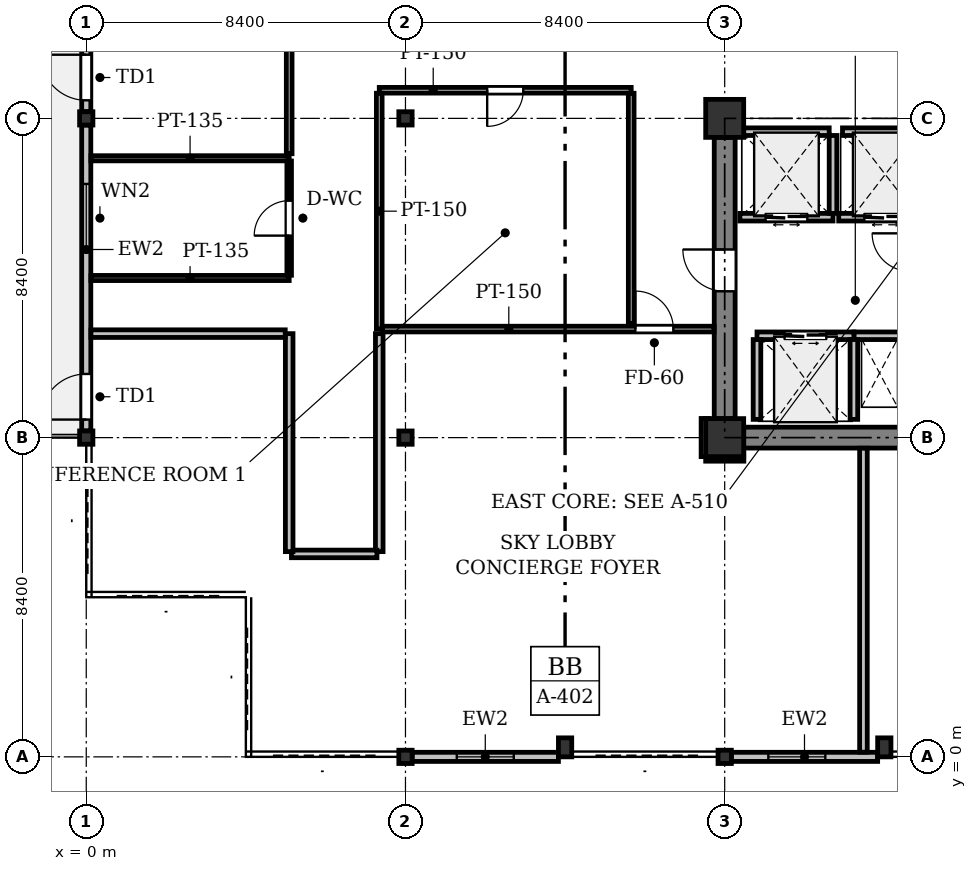
"""IFC4 building model, lengths in metres.
Left out: names, types, materials, properties, quantities, classifications, styles, units other than length and angle.
Written with IfcOpenShell. Run it as: python <this file> out.ifc"""

import sys

from ifc_helpers import new_model, si_unit, direction, frame, frame_2d, origin, origin_2d, place, context, subcontext, project, spatial, rectangle, i_section, extrude, element, fill, save


model = new_model("IFC4")
c1 = context("Model", 3, precision=1e-05, world=origin(), true_north=direction((0.0, 1.0)))
c2 = subcontext(c1, "Body", "Model", "MODEL_VIEW")
j1 = project(units=[si_unit("LENGTHUNIT", "METRE"), si_unit("PLANEANGLEUNIT", "RADIAN")], contexts=[c1])
p1 = place(None, origin())
s1 = spatial("IfcSite", under=j1, at=p1, CompositionType="ELEMENT")
p2 = place(p1, origin())
s2 = spatial("IfcBuilding", under=s1, at=p2, CompositionType="ELEMENT")
p3 = place(p2, frame((0.0, 0.0, 220.6)))
s3 = spatial("IfcBuildingStorey", under=s2, at=p3, CompositionType="ELEMENT", Elevation=220.6)
for number, where, z_axis, x_axis in (
    (1, (0.0, 8.4, 0.0), (0.0, 0.0, 1.0), (1.0, 0.0, 0.0)),
    (2, (0.0, 16.8, 0.0), (0.0, 0.0, 1.0), (1.0, 0.0, 0.0)),
    (3, (8.4, 0.0, 0.0), (0.0, 0.0, 1.0), (1.0, 0.0, 0.0)),
    (4, (8.4, 8.4, 0.0), (0.0, 0.0, 1.0), (1.0, 0.0, 0.0)),
    (5, (8.4, 16.8, 0.0), (0.0, 0.0, 1.0), (1.0, 0.0, 0.0)),
    (6, (16.8, 0.0, 0.0), (0.0, 0.0, 1.0), (1.0, 0.0, 0.0)),
):
    element("IfcColumn", number, at=place(p3, frame(where, z_axis=z_axis, x_axis=x_axis)), inside=s3, PredefinedType="COLUMN", context=c2, shape_type="SweptSolid", body=[
        extrude(i_section(OverallWidth=0.35, OverallDepth=0.35, WebThickness=0.02, FlangeThickness=0.032, at=origin_2d()), origin(), (0.0, 0.0, 1.0), 4.1),
    ])
for number, where, z_axis, x_axis in (
    (7, (16.8, 8.4, 0.0), (0.0, 0.0, 1.0), (1.0, 0.0, 0.0)),
    (8, (16.8, 16.8, 0.0), (0.0, 0.0, 1.0), (1.0, 0.0, 0.0)),
):
    element("IfcColumn", number, at=place(p3, frame(where, z_axis=z_axis, x_axis=x_axis)), inside=s3, PredefinedType="COLUMN", context=c2, shape_type="SweptSolid", body=[
        extrude(rectangle(XDim=1.0, YDim=1.0, at=origin_2d()), origin(), (0.0, 0.0, 1.0), 4.1),
    ])
for number, where, z_axis, x_axis in (
    (9, (12.6, 0.25, 0.0), (0.0, 0.0, 1.0), (1.0, 0.0, 0.0)),
    (10, (21.0, 0.25, 0.0), (0.0, 0.0, 1.0), (1.0, 0.0, 0.0)),
):
    element("IfcColumn", number, at=place(p3, frame(where, z_axis=z_axis, x_axis=x_axis)), inside=s3, PredefinedType="PILASTER", context=c2, shape_type="SweptSolid", body=[
        extrude(rectangle(XDim=0.35, YDim=0.5, at=origin_2d()), origin(), (0.0, 0.0, 1.0), 4.1),
    ])
p4 = place(p3, frame((20.825, 0.0, 0.0), z_axis=(0.0, 0.0, 1.0), x_axis=(-1.0, 0.0, 0.0)))
e11 = element("IfcWall", 11, at=p4, inside=s3, PredefinedType="STANDARD", context=c2, shape_type="SweptSolid", body=[
    extrude(rectangle(XDim=3.85, YDim=0.24, at=frame_2d((1.925, 0.0))), origin(), (0.0, 0.0, 1.0), 3.525),
])
p5 = place(p4, frame((1.377, 0.0, 0.9)))
e12 = element("IfcOpeningElement", 12, at=p5, cuts=e11, PredefinedType="OPENING", context=c2, shape_type="SweptSolid", body=[
    extrude(rectangle(XDim=1.5, YDim=1.6, at=frame_2d((0.75, 0.8))), frame((0.0, 0.13, 0.0), z_axis=(0.0, -1.0, 0.0), x_axis=(1.0, 0.0, 0.0)), (0.0, 0.0, 1.0), 0.26),
])
p6 = place(p3, frame((12.425, 0.0, 0.0), z_axis=(0.0, 0.0, 1.0), x_axis=(-1.0, 0.0, 0.0)))
e13 = element("IfcWall", 13, at=p6, inside=s3, PredefinedType="STANDARD", context=c2, shape_type="SweptSolid", body=[
    extrude(rectangle(XDim=3.85, YDim=0.24, at=frame_2d((1.925, 0.0))), origin(), (0.0, 0.0, 1.0), 3.525),
])
p7 = place(p6, frame((1.175, 0.0, 0.9)))
e14 = element("IfcOpeningElement", 14, at=p7, cuts=e13, PredefinedType="OPENING", context=c2, shape_type="SweptSolid", body=[
    extrude(rectangle(XDim=1.5, YDim=1.6, at=frame_2d((0.75, 0.8))), frame((0.0, 0.13, 0.0), z_axis=(0.0, -1.0, 0.0), x_axis=(1.0, 0.0, 0.0)), (0.0, 0.0, 1.0), 0.26),
])
p8 = place(p3, frame((0.0, 8.575, 0.0), z_axis=(0.0, 0.0, 1.0), x_axis=(0.0, 1.0, 0.0)))
e15 = element("IfcWall", 15, at=p8, inside=s3, PredefinedType="STANDARD", context=c2, shape_type="SweptSolid", body=[
    extrude(rectangle(XDim=8.05, YDim=0.24, at=frame_2d((4.025, 0.0))), origin(), (0.0, 0.0, 1.0), 3.525),
])
p9 = place(p8, frame((0.3, 0.0, 0.0)))
e16 = element("IfcOpeningElement", 16, at=p9, cuts=e15, PredefinedType="OPENING", context=c2, shape_type="SweptSolid", body=[
    extrude(rectangle(XDim=1.2, YDim=2.2, at=frame_2d((0.6, 1.1))), frame((0.0, 0.13, 0.0), z_axis=(0.0, -1.0, 0.0), x_axis=(1.0, 0.0, 0.0)), (0.0, 0.0, 1.0), 0.26),
])
p10 = place(p8, frame((4.7, 0.0, 0.9)))
e17 = element("IfcOpeningElement", 17, at=p10, cuts=e15, PredefinedType="OPENING", context=c2, shape_type="SweptSolid", body=[
    extrude(rectangle(XDim=1.8, YDim=1.6, at=frame_2d((0.9, 0.8))), frame((0.0, 0.13, 0.0), z_axis=(0.0, -1.0, 0.0), x_axis=(1.0, 0.0, 0.0)), (0.0, 0.0, 1.0), 0.26),
])
p11 = place(p3, frame((0.0, 16.975, 0.0), z_axis=(0.0, 0.0, 1.0), x_axis=(0.0, 1.0, 0.0)))
e18 = element("IfcWall", 18, at=p11, inside=s3, PredefinedType="STANDARD", context=c2, shape_type="SweptSolid", body=[
    extrude(rectangle(XDim=8.05, YDim=0.24, at=frame_2d((4.025, 0.0))), origin(), (0.0, 0.0, 1.0), 3.525),
])
p12 = place(p11, frame((0.3, 0.0, 0.0)))
e19 = element("IfcOpeningElement", 19, at=p12, cuts=e18, PredefinedType="OPENING", context=c2, shape_type="SweptSolid", body=[
    extrude(rectangle(XDim=1.2, YDim=2.2, at=frame_2d((0.6, 1.1))), frame((0.0, 0.13, 0.0), z_axis=(0.0, -1.0, 0.0), x_axis=(1.0, 0.0, 0.0)), (0.0, 0.0, 1.0), 0.26),
])
p13 = place(p11, frame((3.275, 0.0, 0.9)))
e20 = element("IfcOpeningElement", 20, at=p13, cuts=e18, PredefinedType="OPENING", context=c2, shape_type="SweptSolid", body=[
    extrude(rectangle(XDim=1.5, YDim=1.6, at=frame_2d((0.75, 0.8))), frame((0.0, 0.13, 0.0), z_axis=(0.0, -1.0, 0.0), x_axis=(1.0, 0.0, 0.0)), (0.0, 0.0, 1.0), 0.26),
])
p14 = place(p3, frame((17.3, 8.4, 0.0), z_axis=(0.0, 0.0, 1.0), x_axis=(1.0, 0.0, 0.0)))
e21 = element("IfcWall", 21, at=p14, inside=s3, PredefinedType="SHEAR", context=c2, shape_type="SweptSolid", body=[
    extrude(rectangle(XDim=7.4, YDim=0.55, at=frame_2d((3.7, 0.0))), origin(), (0.0, 0.0, 1.0), 3.825),
])
p15 = place(p3, frame((16.8, 8.9, 0.0), z_axis=(0.0, 0.0, 1.0), x_axis=(0.0, 1.0, 0.0)))
e22 = element("IfcWall", 22, at=p15, inside=s3, PredefinedType="SHEAR", context=c2, shape_type="SweptSolid", body=[
    extrude(rectangle(XDim=7.4, YDim=0.55, at=frame_2d((3.7, 0.0))), origin(), (0.0, 0.0, 1.0), 3.825),
])
p16 = place(p15, frame((3.35, 0.0, 0.0)))
e23 = element("IfcOpeningElement", 23, at=p16, cuts=e22, PredefinedType="OPENING", context=c2, shape_type="SweptSolid", body=[
    extrude(rectangle(XDim=1.1, YDim=2.15, at=frame_2d((0.55, 1.075))), frame((0.0, 0.285, 0.0), z_axis=(0.0, -1.0, 0.0), x_axis=(1.0, 0.0, 0.0)), (0.0, 0.0, 1.0), 0.57),
])
p17 = place(p3, frame((20.2, 11.08, 0.0), z_axis=(0.0, 0.0, 1.0), x_axis=(1.0, 0.0, 0.0)))
e24 = element("IfcWall", 24, at=p17, inside=s3, PredefinedType="PARTITIONING", context=c2, shape_type="SweptSolid", body=[
    extrude(rectangle(XDim=1.35, YDim=0.2, at=frame_2d((0.675, 0.0))), origin(), (0.0, 0.0, 1.0), 3.825),
])
p18 = place(p3, frame((17.65, 11.08, 0.0), z_axis=(0.0, 0.0, 1.0), x_axis=(1.0, 0.0, 0.0)))
e25 = element("IfcWall", 25, at=p18, inside=s3, PredefinedType="PARTITIONING", context=c2, shape_type="SweptSolid", body=[
    extrude(rectangle(XDim=2.55, YDim=0.2, at=frame_2d((1.275, 0.0))), origin(), (0.0, 0.0, 1.0), 3.825),
])
p19 = place(p18, frame((0.725, 0.0, 0.0)))
e26 = element("IfcOpeningElement", 26, at=p19, cuts=e25, PredefinedType="OPENING", context=c2, shape_type="SweptSolid", body=[
    extrude(rectangle(XDim=1.1, YDim=2.2, at=frame_2d((0.55, 1.1))), frame((0.0, 0.11, 0.0), z_axis=(0.0, -1.0, 0.0), x_axis=(1.0, 0.0, 0.0)), (0.0, 0.0, 1.0), 0.22),
])
for number, where, z_axis, x_axis in (
    (27, (20.2, 8.88, 0.0), (0.0, 0.0, 1.0), (0.0, 1.0, 0.0)),
    (28, (17.65, 8.88, 0.0), (0.0, 0.0, 1.0), (0.0, 1.0, 0.0)),
):
    element("IfcWall", number, at=place(p3, frame(where, z_axis=z_axis, x_axis=x_axis)), inside=s3, PredefinedType="PARTITIONING", context=c2, shape_type="SweptSolid", body=[
        extrude(rectangle(XDim=2.1, YDim=0.2, at=frame_2d((1.05, 0.0))), origin(), (0.0, 0.0, 1.0), 3.825),
    ])
p20 = place(p3, frame((17.2, 14.2, 0.0), z_axis=(0.0, 0.0, 1.0), x_axis=(1.0, 0.0, 0.0)))
e29 = element("IfcWall", 29, at=p20, inside=s3, PredefinedType="PARTITIONING", context=c2, shape_type="SweptSolid", body=[
    extrude(rectangle(XDim=2.45, YDim=0.2, at=frame_2d((1.225, 0.0))), origin(), (0.0, 0.0, 1.0), 3.825),
])
p21 = place(p20, frame((0.675, 0.0, 0.0)))
e30 = element("IfcOpeningElement", 30, at=p21, cuts=e29, PredefinedType="OPENING", context=c2, shape_type="SweptSolid", body=[
    extrude(rectangle(XDim=1.1, YDim=2.2, at=frame_2d((0.55, 1.1))), frame((0.0, 0.11, 0.0), z_axis=(0.0, -1.0, 0.0), x_axis=(1.0, 0.0, 0.0)), (0.0, 0.0, 1.0), 0.22),
])
p22 = place(p3, frame((19.65, 14.3, 0.0), z_axis=(0.0, 0.0, 1.0), x_axis=(0.0, 1.0, 0.0)))
e31 = element("IfcWall", 31, at=p22, inside=s3, PredefinedType="PARTITIONING", context=c2, shape_type="SweptSolid", body=[
    extrude(rectangle(XDim=2.05, YDim=0.2, at=frame_2d((1.025, 0.0))), origin(), (0.0, 0.0, 1.0), 3.825),
])
p23 = place(p3, frame((17.3, 16.45, 0.0), z_axis=(0.0, 0.0, 1.0), x_axis=(1.0, 0.0, 0.0)))
e32 = element("IfcWall", 32, at=p23, inside=s3, PredefinedType="PARTITIONING", context=c2, shape_type="SweptSolid", body=[
    extrude(rectangle(XDim=2.25, YDim=0.2, at=frame_2d((1.125, 0.0))), origin(), (0.0, 0.0, 1.0), 3.825),
])
p24 = place(p3, frame((19.8, 14.2, 0.0), z_axis=(0.0, 0.0, 1.0), x_axis=(1.0, 0.0, 0.0)))
e33 = element("IfcWall", 33, at=p24, inside=s3, PredefinedType="PARTITIONING", context=c2, shape_type="SweptSolid", body=[
    extrude(rectangle(XDim=2.45, YDim=0.2, at=frame_2d((1.225, 0.0))), origin(), (0.0, 0.0, 1.0), 3.825),
])
p25 = place(p24, frame((0.675, 0.0, 0.0)))
e34 = element("IfcOpeningElement", 34, at=p25, cuts=e33, PredefinedType="OPENING", context=c2, shape_type="SweptSolid", body=[
    extrude(rectangle(XDim=1.1, YDim=2.2, at=frame_2d((0.55, 1.1))), frame((0.0, 0.11, 0.0), z_axis=(0.0, -1.0, 0.0), x_axis=(1.0, 0.0, 0.0)), (0.0, 0.0, 1.0), 0.22),
])
p26 = place(p3, frame((19.9, 16.45, 0.0), z_axis=(0.0, 0.0, 1.0), x_axis=(1.0, 0.0, 0.0)))
e35 = element("IfcWall", 35, at=p26, inside=s3, PredefinedType="PARTITIONING", context=c2, shape_type="SweptSolid", body=[
    extrude(rectangle(XDim=2.25, YDim=0.2, at=frame_2d((1.125, 0.0))), origin(), (0.0, 0.0, 1.0), 3.825),
])
for number, where, z_axis, x_axis in (
    (36, (5.34, 15.75, 0.0), (0.0, 0.0, 1.0), (-1.0, 0.0, 0.0)),
    (37, (0.124, 12.6, 0.0), (0.0, 0.0, 1.0), (1.0, 0.0, 0.0)),
):
    element("IfcWall", number, at=place(p3, frame(where, z_axis=z_axis, x_axis=x_axis)), inside=s3, PredefinedType="PARTITIONING", context=c2, shape_type="SweptSolid", body=[
        extrude(rectangle(XDim=5.216, YDim=0.135, at=frame_2d((2.608, 0.0))), origin(), (0.0, 0.0, 1.0), 3.518),
    ])
p27 = place(p3, frame((5.34, 12.671, 0.0), z_axis=(0.0, 0.0, 1.0), x_axis=(0.0, 1.0, 0.0)))
e38 = element("IfcWall", 38, at=p27, inside=s3, PredefinedType="PARTITIONING", context=c2, shape_type="SweptSolid", body=[
    extrude(rectangle(XDim=3.007, YDim=0.12, at=frame_2d((1.503, 0.0))), origin(), (0.0, 0.0, 1.0), 3.825),
])
p28 = place(p27, frame((1.043, 0.0, 0.0)))
e39 = element("IfcOpeningElement", 39, at=p28, cuts=e38, PredefinedType="OPENING", context=c2, shape_type="SweptSolid", body=[
    extrude(rectangle(XDim=0.92, YDim=2.1, at=frame_2d((0.46, 1.05))), frame((0.0, 0.07, 0.0), z_axis=(0.0, -1.0, 0.0), x_axis=(1.0, 0.0, 0.0)), (0.0, 0.0, 1.0), 0.14),
])
p29 = place(p3, frame((14.34, 17.54, 0.0), z_axis=(0.0, 0.0, 1.0), x_axis=(-1.0, 0.0, 0.0)))
e40 = element("IfcWall", 40, at=p29, inside=s3, PredefinedType="PARTITIONING", context=c2, shape_type="SweptSolid", body=[
    extrude(rectangle(XDim=6.63, YDim=0.15, at=frame_2d((3.315, 0.0))), origin(), (0.0, 0.0, 1.0), 3.371),
])
p30 = place(p29, frame((2.84, 0.0, 0.0)))
e41 = element("IfcOpeningElement", 41, at=p30, cuts=e40, PredefinedType="OPENING", context=c2, shape_type="SweptSolid", body=[
    extrude(rectangle(XDim=0.95, YDim=2.15, at=frame_2d((0.475, 1.075))), frame((0.0, 0.085, 0.0), z_axis=(0.0, -1.0, 0.0), x_axis=(1.0, 0.0, 0.0)), (0.0, 0.0, 1.0), 0.17),
])
p31 = place(p3, frame((7.71, 17.461, 0.0), z_axis=(0.0, 0.0, 1.0), x_axis=(0.0, -1.0, 0.0)))
e42 = element("IfcWall", 42, at=p31, inside=s3, PredefinedType="PARTITIONING", context=c2, shape_type="SweptSolid", body=[
    extrude(rectangle(XDim=6.205, YDim=0.15, at=frame_2d((3.103, 0.0))), origin(), (0.0, 0.0, 1.0), 3.365),
])
p32 = place(p3, frame((7.789, 11.256, 0.0), z_axis=(0.0, 0.0, 1.0), x_axis=(1.0, 0.0, 0.0)))
e43 = element("IfcWall", 43, at=p32, inside=s3, PredefinedType="PARTITIONING", context=c2, shape_type="SweptSolid", body=[
    extrude(rectangle(XDim=8.732, YDim=0.15, at=frame_2d((4.366, 0.0))), origin(), (0.0, 0.0, 1.0), 3.371),
])
p33 = place(p32, frame((6.66, 0.0, 0.0)))
e44 = element("IfcOpeningElement", 44, at=p33, cuts=e43, PredefinedType="OPENING", context=c2, shape_type="SweptSolid", body=[
    extrude(rectangle(XDim=1.0, YDim=2.15, at=frame_2d((0.5, 1.075))), frame((0.0, 0.085, 0.0), z_axis=(0.0, -1.0, 0.0), x_axis=(1.0, 0.0, 0.0)), (0.0, 0.0, 1.0), 0.17),
])
p34 = place(p3, frame((14.34, 11.4, 0.0), z_axis=(0.0, 0.0, 1.0), x_axis=(0.0, 1.0, 0.0)))
e45 = element("IfcWall", 45, at=p34, inside=s3, PredefinedType="PARTITIONING", context=c2, shape_type="SweptSolid", body=[
    extrude(rectangle(XDim=6.061, YDim=0.15, at=frame_2d((3.031, 0.0))), origin(), (0.0, 0.0, 1.0), 3.365),
])
p35 = place(p3, frame((5.34, 15.87, 0.0), z_axis=(0.0, 0.0, 1.0), x_axis=(0.0, 1.0, 0.0)))
e46 = element("IfcWall", 46, at=p35, inside=s3, PredefinedType="PARTITIONING", context=c2, shape_type="SweptSolid", body=[
    extrude(rectangle(XDim=9.28, YDim=0.15, at=frame_2d((4.64, 0.0))), origin(), (0.0, 0.0, 1.0), 3.365),
])
p36 = place(p35, frame((4.165, 0.0, 0.0)))
e47 = element("IfcOpeningElement", 47, at=p36, cuts=e46, PredefinedType="OPENING", context=c2, shape_type="SweptSolid", body=[
    extrude(rectangle(XDim=0.95, YDim=2.15, at=frame_2d((0.475, 1.075))), frame((0.0, 0.085, 0.0), z_axis=(0.0, -1.0, 0.0), x_axis=(1.0, 0.0, 0.0)), (0.0, 0.0, 1.0), 0.17),
])
p37 = place(p3, frame((20.451, 8.121, 0.0), z_axis=(0.0, 0.0, 1.0), x_axis=(0.0, -1.0, 0.0)))
e48 = element("IfcWall", 48, at=p37, inside=s3, PredefinedType="PARTITIONING", context=c2, shape_type="SweptSolid", body=[
    extrude(rectangle(XDim=7.997, YDim=0.2, at=frame_2d((3.999, 0.0))), origin(), (0.0, 0.0, 1.0), 3.825),
])
p38 = place(p3, frame((17.304, 7.88, 0.0), z_axis=(0.0, 0.0, 1.0), x_axis=(-0.999999881717, -0.000486381265, 0.0)))
e49 = element("IfcWall", 49, at=p38, inside=s3, PredefinedType="PARTITIONING", context=c2, shape_type="SweptSolid", body=[
    extrude(rectangle(XDim=1.004, YDim=0.2, at=frame_2d((0.502, 0.0))), origin(), (0.0, 0.0, 1.0), 3.371),
])
p39 = place(p3, frame((16.28, 7.9, 0.0), z_axis=(0.0, 0.0, 1.0), x_axis=(0.000486381265, 0.999999881717, 0.0)))
e50 = element("IfcWall", 50, at=p39, inside=s3, PredefinedType="PARTITIONING", context=c2, shape_type="SweptSolid", body=[
    extrude(rectangle(XDim=1.004, YDim=0.2, at=frame_2d((0.502, 0.0))), origin(), (0.0, 0.0, 1.0), 3.365),
])
p40 = place(p3, frame((7.71, 11.136, 0.0), z_axis=(0.0, 0.0, 1.0), x_axis=(0.0, -1.0, 0.0)))
e51 = element("IfcWall", 51, at=p40, inside=s3, PredefinedType="PARTITIONING", context=c2, shape_type="SweptSolid", body=[
    extrude(rectangle(XDim=5.736, YDim=0.2, at=frame_2d((2.868, 0.0))), origin(), (0.0, 0.0, 1.0), 3.365),
])
p41 = place(p3, frame((7.65, 5.34, 0.0), z_axis=(0.0, 0.0, 1.0), x_axis=(-1.0, 0.0, 0.0)))
e52 = element("IfcWall", 52, at=p41, inside=s3, PredefinedType="PARTITIONING", context=c2, shape_type="SweptSolid", body=[
    extrude(rectangle(XDim=2.25, YDim=0.2, at=frame_2d((1.125, 0.0))), origin(), (0.0, 0.0, 1.0), 3.825),
])
p42 = place(p3, frame((5.34, 5.4, 0.0), z_axis=(0.0, 0.0, 1.0), x_axis=(0.0, 1.0, 0.0)))
e53 = element("IfcWall", 53, at=p42, inside=s3, PredefinedType="PARTITIONING", context=c2, shape_type="SweptSolid", body=[
    extrude(rectangle(XDim=5.736, YDim=0.2, at=frame_2d((2.868, 0.0))), origin(), (0.0, 0.0, 1.0), 3.365),
])
p43 = place(p3, frame((5.236, 11.136, 0.0), z_axis=(0.0, 0.0, 1.0), x_axis=(-1.0, 0.0, 0.0)))
e54 = element("IfcWall", 54, at=p43, inside=s3, PredefinedType="PARTITIONING", context=c2, shape_type="SweptSolid", body=[
    extrude(rectangle(XDim=5.112, YDim=0.2, at=frame_2d((2.556, 0.0))), origin(), (0.0, 0.0, 1.0), 3.518),
])
p44 = place(p5, origin())
e55 = element("IfcWindow", 55, at=p44, inside=s3, PartitioningType="SINGLE_PANEL", PredefinedType="WINDOW", context=c2, shape_type="SweptSolid", body=[
    extrude(rectangle(XDim=1.5, YDim=1.6, at=frame_2d((0.75, 0.8))), frame((0.0, 0.03, 0.0), z_axis=(0.0, -1.0, 0.0), x_axis=(1.0, 0.0, 0.0)), (0.0, 0.0, 1.0), 0.06),
])
fill(e12, e55)
p45 = place(p7, origin())
e56 = element("IfcWindow", 56, at=p45, inside=s3, PartitioningType="SINGLE_PANEL", PredefinedType="WINDOW", context=c2, shape_type="SweptSolid", body=[
    extrude(rectangle(XDim=1.5, YDim=1.6, at=frame_2d((0.75, 0.8))), frame((0.0, 0.03, 0.0), z_axis=(0.0, -1.0, 0.0), x_axis=(1.0, 0.0, 0.0)), (0.0, 0.0, 1.0), 0.06),
])
fill(e14, e56)
p46 = place(p9, origin())
e57 = element("IfcDoor", 57, at=p46, inside=s3, OperationType="SINGLE_SWING_LEFT", PredefinedType="DOOR", context=c2, shape_type="SweptSolid", body=[
    extrude(rectangle(XDim=1.2, YDim=2.2, at=frame_2d((0.6, 1.1))), frame((0.0, 0.025, 0.0), z_axis=(0.0, -1.0, 0.0), x_axis=(1.0, 0.0, 0.0)), (0.0, 0.0, 1.0), 0.05),
])
fill(e16, e57)
p47 = place(p10, origin())
e58 = element("IfcWindow", 58, at=p47, inside=s3, PartitioningType="SINGLE_PANEL", PredefinedType="WINDOW", context=c2, shape_type="SweptSolid", body=[
    extrude(rectangle(XDim=1.8, YDim=1.6, at=frame_2d((0.9, 0.8))), frame((0.0, 0.03, 0.0), z_axis=(0.0, -1.0, 0.0), x_axis=(1.0, 0.0, 0.0)), (0.0, 0.0, 1.0), 0.06),
])
fill(e17, e58)
p48 = place(p12, origin())
e59 = element("IfcDoor", 59, at=p48, inside=s3, OperationType="SINGLE_SWING_RIGHT", PredefinedType="DOOR", context=c2, shape_type="SweptSolid", body=[
    extrude(rectangle(XDim=1.2, YDim=2.2, at=frame_2d((0.6, 1.1))), frame((0.0, 0.025, 0.0), z_axis=(0.0, -1.0, 0.0), x_axis=(1.0, 0.0, 0.0)), (0.0, 0.0, 1.0), 0.05),
])
fill(e19, e59)
p49 = place(p16, origin())
e60 = element("IfcDoor", 60, at=p49, inside=s3, OperationType="SINGLE_SWING_RIGHT", PredefinedType="DOOR", context=c2, shape_type="SweptSolid", body=[
    extrude(rectangle(XDim=1.1, YDim=2.15, at=frame_2d((0.55, 1.075))), frame((0.0, 0.025, 0.0), z_axis=(0.0, -1.0, 0.0), x_axis=(1.0, 0.0, 0.0)), (0.0, 0.0, 1.0), 0.05),
])
fill(e23, e60)
p50 = place(p19, origin())
e61 = element("IfcDoor", 61, at=p50, inside=s3, OperationType="DOUBLE_DOOR_SLIDING", PredefinedType="DOOR", context=c2, shape_type="SweptSolid", body=[
    extrude(rectangle(XDim=1.1, YDim=2.2, at=frame_2d((0.55, 1.1))), frame((0.0, 0.025, 0.0), z_axis=(0.0, -1.0, 0.0), x_axis=(1.0, 0.0, 0.0)), (0.0, 0.0, 1.0), 0.05),
])
fill(e26, e61)
p51 = place(p21, origin())
e62 = element("IfcDoor", 62, at=p51, inside=s3, OperationType="DOUBLE_DOOR_SLIDING", PredefinedType="DOOR", context=c2, shape_type="SweptSolid", body=[
    extrude(rectangle(XDim=1.1, YDim=2.2, at=frame_2d((0.55, 1.1))), frame((0.0, 0.025, 0.0), z_axis=(0.0, -1.0, 0.0), x_axis=(1.0, 0.0, 0.0)), (0.0, 0.0, 1.0), 0.05),
])
fill(e30, e62)
p52 = place(p25, origin())
e63 = element("IfcDoor", 63, at=p52, inside=s3, OperationType="DOUBLE_DOOR_SLIDING", PredefinedType="DOOR", context=c2, shape_type="SweptSolid", body=[
    extrude(rectangle(XDim=1.1, YDim=2.2, at=frame_2d((0.55, 1.1))), frame((0.0, 0.025, 0.0), z_axis=(0.0, -1.0, 0.0), x_axis=(1.0, 0.0, 0.0)), (0.0, 0.0, 1.0), 0.05),
])
fill(e34, e63)
p53 = place(p28, origin())
e64 = element("IfcDoor", 64, at=p53, inside=s3, OperationType="SINGLE_SWING_LEFT", PredefinedType="DOOR", context=c2, shape_type="SweptSolid", body=[
    extrude(rectangle(XDim=0.92, YDim=2.1, at=frame_2d((0.46, 1.05))), frame((0.0, 0.025, 0.0), z_axis=(0.0, -1.0, 0.0), x_axis=(1.0, 0.0, 0.0)), (0.0, 0.0, 1.0), 0.05),
])
fill(e39, e64)
p54 = place(p30, origin())
e65 = element("IfcDoor", 65, at=p54, inside=s3, OperationType="SINGLE_SWING_RIGHT", PredefinedType="DOOR", context=c2, shape_type="SweptSolid", body=[
    extrude(rectangle(XDim=0.95, YDim=2.15, at=frame_2d((0.475, 1.075))), frame((0.0, 0.025, 0.0), z_axis=(0.0, -1.0, 0.0), x_axis=(1.0, 0.0, 0.0)), (0.0, 0.0, 1.0), 0.05),
])
fill(e41, e65)
p55 = place(p33, origin())
e66 = element("IfcDoor", 66, at=p55, inside=s3, OperationType="SINGLE_SWING_LEFT", PredefinedType="DOOR", context=c2, shape_type="SweptSolid", body=[
    extrude(rectangle(XDim=1.0, YDim=2.15, at=frame_2d((0.5, 1.075))), frame((0.0, 0.025, 0.0), z_axis=(0.0, -1.0, 0.0), x_axis=(1.0, 0.0, 0.0)), (0.0, 0.0, 1.0), 0.05),
])
fill(e44, e66)
save(model, sys.argv[1])
